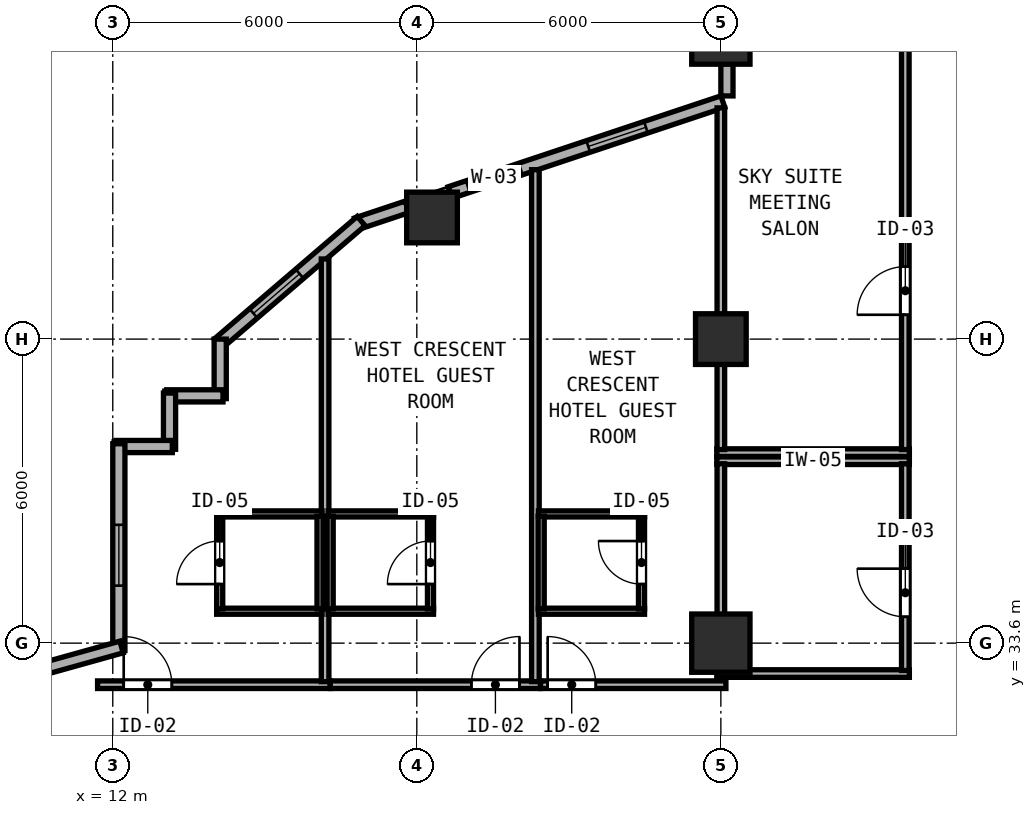
"""IFC4 building model, lengths in metres.
Left out: names, types, materials, properties, quantities, classifications, styles, units other than length and angle.
Written with IfcOpenShell. Run it as: python <this file> out.ifc"""

import sys

from ifc_helpers import new_model, si_unit, direction, frame, frame_2d, origin, origin_2d, place, context, subcontext, project, spatial, rectangle, hollow_rectangle, extrude, element, fill, save


model = new_model("IFC4")
c1 = context("Model", 3, precision=1e-05, world=origin(), true_north=direction((0.0, 1.0)))
c2 = subcontext(c1, "Body", "Model", "MODEL_VIEW")
j1 = project(units=[si_unit("LENGTHUNIT", "METRE"), si_unit("PLANEANGLEUNIT", "RADIAN")], contexts=[c1])
p1 = place(None, origin())
s1 = spatial("IfcSite", under=j1, at=p1, CompositionType="ELEMENT")
p2 = place(p1, origin())
s2 = spatial("IfcBuilding", under=s1, at=p2, CompositionType="ELEMENT")
p3 = place(p2, frame((0.0, 0.0, 85.6)))
s3 = spatial("IfcBuildingStorey", under=s2, at=p3, CompositionType="ELEMENT", Elevation=85.6)
for number, where, z_axis, x_axis in (
    (1, (24.0, 33.6, 0.0), (0.0, 0.0, 1.0), (1.0, 0.0, 0.0)),
    (2, (24.0, 45.6, 0.0), (0.0, 0.0, 1.0), (1.0, 0.0, 0.0)),
):
    element("IfcColumn", number, at=place(p3, frame(where, z_axis=z_axis, x_axis=x_axis)), inside=s3, PredefinedType="COLUMN", context=c2, shape_type="SweptSolid", body=[
        extrude(hollow_rectangle(XDim=1.15, YDim=1.15, WallThickness=0.042, at=origin_2d()), origin(), (0.0, 0.0, 1.0), 3.8),
    ])
for number, where, z_axis, x_axis in (
    (3, (24.0, 39.6, 0.0), (0.0, 0.0, 1.0), (1.0, 0.0, 0.0)),
    (4, (18.3, 42.0, 0.0), (0.0, 0.0, 1.0), (1.0, 0.0, 0.0)),
):
    element("IfcColumn", number, at=place(p3, frame(where, z_axis=z_axis, x_axis=x_axis)), inside=s3, PredefinedType="COLUMN", context=c2, shape_type="SweptSolid", body=[
        extrude(hollow_rectangle(XDim=1.0, YDim=1.0, WallThickness=0.038, at=origin_2d()), origin(), (0.0, 0.0, 1.0), 3.8),
    ])
p4 = place(p3, frame((24.12, 45.033, 0.0), z_axis=(0.0, 0.0, 1.0), x_axis=(0.0, -1.0, 0.0)))
e5 = element("IfcWall", 5, at=p4, inside=s3, PredefinedType="SOLIDWALL", context=c2, shape_type="SweptSolid", body=[
    extrude(rectangle(XDim=0.635, YDim=0.24, at=frame_2d((0.317, 0.0))), origin(), (0.0, 0.0, 1.0), 3.037),
])
p5 = place(p3, frame((24.039, 44.287, 0.0), z_axis=(0.0, 0.0, 1.0), x_axis=(-0.948678995954, -0.316240672014, 0.0)))
e6 = element("IfcWall", 6, at=p5, inside=s3, PredefinedType="SOLIDWALL", context=c2, shape_type="SweptSolid", body=[
    extrude(rectangle(XDim=5.675, YDim=0.24, at=frame_2d((2.837, 0.0))), origin(), (0.0, 0.0, 1.0), 3.037),
])
p6 = place(p5, frame((1.6, 0.0, 0.85)))
e7 = element("IfcOpeningElement", 7, at=p6, cuts=e6, PredefinedType="OPENING", context=c2, shape_type="SweptSolid", body=[
    extrude(rectangle(XDim=1.2, YDim=1.85, at=frame_2d((0.6, 0.925))), frame((0.0, 0.13, 0.0), z_axis=(0.0, -1.0, 0.0), x_axis=(1.0, 0.0, 0.0)), (0.0, 0.0, 1.0), 0.26),
])
p7 = place(p5, frame((4.206, 0.0, 0.85)))
e8 = element("IfcOpeningElement", 8, at=p7, cuts=e6, PredefinedType="OPENING", context=c2, shape_type="SweptSolid", body=[
    extrude(rectangle(XDim=1.1, YDim=1.75, at=frame_2d((0.55, 0.875))), frame((0.0, 0.13, 0.0), z_axis=(0.0, -1.0, 0.0), x_axis=(1.0, 0.0, 0.0)), (0.0, 0.0, 1.0), 0.26),
])
p8 = place(p3, frame((17.808, 42.209, 0.0), z_axis=(0.0, 0.0, 1.0), x_axis=(-0.948706457285, -0.316158279832, 0.0)))
e9 = element("IfcWall", 9, at=p8, inside=s3, PredefinedType="SOLIDWALL", context=c2, shape_type="SweptSolid", body=[
    extrude(rectangle(XDim=1.054, YDim=0.24, at=frame_2d((0.527, 0.0))), origin(), (0.0, 0.0, 1.0), 3.54),
])
p9 = place(p3, frame((16.902, 41.929, 0.0), z_axis=(0.0, 0.0, 1.0), x_axis=(-0.759275136126, -0.650769750112, 0.0)))
e10 = element("IfcWall", 10, at=p9, inside=s3, PredefinedType="SOLIDWALL", context=c2, shape_type="SweptSolid", body=[
    extrude(rectangle(XDim=3.719, YDim=0.24, at=frame_2d((1.86, 0.0))), origin(), (0.0, 0.0, 1.0), 3.54),
])
p10 = place(p9, frame((1.6, 0.0, 0.85)))
e11 = element("IfcOpeningElement", 11, at=p10, cuts=e10, PredefinedType="OPENING", context=c2, shape_type="SweptSolid", body=[
    extrude(rectangle(XDim=1.2, YDim=1.85, at=frame_2d((0.6, 0.925))), frame((0.0, 0.13, 0.0), z_axis=(0.0, -1.0, 0.0), x_axis=(1.0, 0.0, 0.0)), (0.0, 0.0, 1.0), 0.26),
])
p11 = place(p3, frame((14.12, 39.6, 0.0), z_axis=(0.0, 0.0, 1.0), x_axis=(0.0, -1.0, 0.0)))
e12 = element("IfcWall", 12, at=p11, inside=s3, PredefinedType="SOLIDWALL", context=c2, shape_type="SweptSolid", body=[
    extrude(rectangle(XDim=1.175, YDim=0.24, at=frame_2d((0.587, 0.0))), origin(), (0.0, 0.0, 1.0), 3.54),
])
p12 = place(p3, frame((14.175, 38.48, 0.0), z_axis=(0.0, 0.0, 1.0), x_axis=(-1.0, 0.0, 0.0)))
e13 = element("IfcWall", 13, at=p12, inside=s3, PredefinedType="SOLIDWALL", context=c2, shape_type="SweptSolid", body=[
    extrude(rectangle(XDim=1.11, YDim=0.24, at=frame_2d((0.555, 0.0))), origin(), (0.0, 0.0, 1.0), 3.54),
])
p13 = place(p3, frame((13.12, 38.535, 0.0), z_axis=(0.0, 0.0, 1.0), x_axis=(0.0, -1.0, 0.0)))
e14 = element("IfcWall", 14, at=p13, inside=s3, PredefinedType="SOLIDWALL", context=c2, shape_type="SweptSolid", body=[
    extrude(rectangle(XDim=1.11, YDim=0.24, at=frame_2d((0.555, 0.0))), origin(), (0.0, 0.0, 1.0), 3.54),
])
p14 = place(p3, frame((13.175, 37.48, 0.0), z_axis=(0.0, 0.0, 1.0), x_axis=(-1.0, 0.0, 0.0)))
e15 = element("IfcWall", 15, at=p14, inside=s3, PredefinedType="SOLIDWALL", context=c2, shape_type="SweptSolid", body=[
    extrude(rectangle(XDim=1.11, YDim=0.24, at=frame_2d((0.555, 0.0))), origin(), (0.0, 0.0, 1.0), 3.54),
])
p15 = place(p3, frame((12.12, 37.535, 0.0), z_axis=(0.0, 0.0, 1.0), x_axis=(0.0, -1.0, 0.0)))
e16 = element("IfcWall", 16, at=p15, inside=s3, PredefinedType="SOLIDWALL", context=c2, shape_type="SweptSolid", body=[
    extrude(rectangle(XDim=4.081, YDim=0.24, at=frame_2d((2.041, 0.0))), origin(), (0.0, 0.0, 1.0), 3.54),
])
p16 = place(p15, frame((1.6, 0.0, 0.85)))
e17 = element("IfcOpeningElement", 17, at=p16, cuts=e16, PredefinedType="OPENING", context=c2, shape_type="SweptSolid", body=[
    extrude(rectangle(XDim=1.2, YDim=1.85, at=frame_2d((0.6, 0.925))), frame((0.0, 0.13, 0.0), z_axis=(0.0, -1.0, 0.0), x_axis=(1.0, 0.0, 0.0)), (0.0, 0.0, 1.0), 0.26),
])
p17 = place(p3, frame((12.173, 33.524, 0.0), z_axis=(0.0, 0.0, 1.0), x_axis=(-0.963197271032, -0.268795493036, 0.0)))
e18 = element("IfcWall", 18, at=p17, inside=s3, PredefinedType="SOLIDWALL", context=c2, shape_type="SweptSolid", body=[
    extrude(rectangle(XDim=9.095, YDim=0.24, at=frame_2d((4.548, 0.0))), origin(), (0.0, 0.0, 1.0), 3.54),
])
p18 = place(p17, frame((1.6, 0.0, 0.85)))
e19 = element("IfcOpeningElement", 19, at=p18, cuts=e18, PredefinedType="OPENING", context=c2, shape_type="SweptSolid", body=[
    extrude(rectangle(XDim=1.2, YDim=1.85, at=frame_2d((0.6, 0.925))), frame((0.0, 0.13, 0.0), z_axis=(0.0, -1.0, 0.0), x_axis=(1.0, 0.0, 0.0)), (0.0, 0.0, 1.0), 0.26),
])
p19 = place(p17, frame((7.0, 0.0, 0.85)))
e20 = element("IfcOpeningElement", 20, at=p19, cuts=e18, PredefinedType="OPENING", context=c2, shape_type="SweptSolid", body=[
    extrude(rectangle(XDim=1.2, YDim=1.85, at=frame_2d((0.6, 0.925))), frame((0.0, 0.13, 0.0), z_axis=(0.0, -1.0, 0.0), x_axis=(1.0, 0.0, 0.0)), (0.0, 0.0, 1.0), 0.26),
])
for number, where, z_axis, x_axis in (
    (21, (23.92, 37.2, 0.0), (0.0, 0.0, 1.0), (1.0, 0.0, 0.0)),
    (22, (23.92, 33.0, 0.0), (0.0, 0.0, 1.0), (1.0, 0.0, 0.0)),
):
    element("IfcWall", number, at=place(p3, frame(where, z_axis=z_axis, x_axis=x_axis)), inside=s3, PredefinedType="PARTITIONING", context=c2, shape_type="SweptSolid", body=[
        extrude(rectangle(XDim=3.8, YDim=0.15, at=frame_2d((1.9, 0.0))), origin(), (0.0, 0.0, 1.0), 3.54),
    ])
p20 = place(p3, frame((24.0, 33.06, 0.0), z_axis=(0.0, 0.0, 1.0), x_axis=(0.0, 1.0, 0.0)))
e23 = element("IfcWall", 23, at=p20, inside=s3, PredefinedType="PARTITIONING", context=c2, shape_type="SweptSolid", body=[
    extrude(rectangle(XDim=4.08, YDim=0.15, at=frame_2d((2.04, 0.0))), origin(), (0.0, 0.0, 1.0), 3.037),
])
p21 = place(p3, frame((27.64, 33.06, 0.0), z_axis=(0.0, 0.0, 1.0), x_axis=(0.0, 1.0, 0.0)))
e24 = element("IfcWall", 24, at=p21, inside=s3, PredefinedType="PARTITIONING", context=c2, shape_type="SweptSolid", body=[
    extrude(rectangle(XDim=4.08, YDim=0.15, at=frame_2d((2.04, 0.0))), origin(), (0.0, 0.0, 1.0), 3.54),
])
p22 = place(p21, frame((2.01, 0.0, 0.0), z_axis=(0.0, 0.0, 1.0), x_axis=(-1.0, 0.0, 0.0)))
e25 = element("IfcOpeningElement", 25, at=p22, cuts=e24, PredefinedType="OPENING", context=c2, shape_type="SweptSolid", body=[
    extrude(rectangle(XDim=0.95, YDim=2.12, at=frame_2d((0.475, 1.06))), frame((0.0, 0.085, 0.0), z_axis=(0.0, -1.0, 0.0), x_axis=(1.0, 0.0, 0.0)), (0.0, 0.0, 1.0), 0.17),
])
p23 = place(p3, frame((23.92, 37.36, 0.0), z_axis=(0.0, 0.0, 1.0), x_axis=(1.0, 0.0, 0.0)))
e26 = element("IfcWall", 26, at=p23, inside=s3, PredefinedType="PARTITIONING", context=c2, shape_type="SweptSolid", body=[
    extrude(rectangle(XDim=3.8, YDim=0.15, at=frame_2d((1.9, 0.0))), origin(), (0.0, 0.0, 1.0), 3.54),
])
p24 = place(p3, frame((24.0, 37.42, 0.0), z_axis=(0.0, 0.0, 1.0), x_axis=(0.0, 1.0, 0.0)))
e27 = element("IfcWall", 27, at=p24, inside=s3, PredefinedType="PARTITIONING", context=c2, shape_type="SweptSolid", body=[
    extrude(rectangle(XDim=6.743, YDim=0.15, at=frame_2d((3.372, 0.0))), origin(), (0.0, 0.0, 1.0), 3.037),
])
p25 = place(p3, frame((27.64, 37.42, 0.0), z_axis=(0.0, 0.0, 1.0), x_axis=(0.0, 1.0, 0.0)))
e28 = element("IfcWall", 28, at=p25, inside=s3, PredefinedType="PARTITIONING", context=c2, shape_type="SweptSolid", body=[
    extrude(rectangle(XDim=8.54, YDim=0.15, at=frame_2d((4.27, 0.0))), origin(), (0.0, 0.0, 1.0), 3.54),
])
p26 = place(p25, frame((3.61, 0.0, 0.0), z_axis=(0.0, 0.0, 1.0), x_axis=(-1.0, 0.0, 0.0)))
e29 = element("IfcOpeningElement", 29, at=p26, cuts=e28, PredefinedType="OPENING", context=c2, shape_type="SweptSolid", body=[
    extrude(rectangle(XDim=0.95, YDim=2.12, at=frame_2d((0.475, 1.06))), frame((0.0, 0.085, 0.0), z_axis=(0.0, -1.0, 0.0), x_axis=(1.0, 0.0, 0.0)), (0.0, 0.0, 1.0), 0.17),
])
p27 = place(p3, frame((11.7, 32.78, 0.0), z_axis=(0.0, 0.0, 1.0), x_axis=(1.0, 0.0, 0.0)))
e30 = element("IfcWall", 30, at=p27, inside=s3, PredefinedType="PARTITIONING", context=c2, shape_type="SweptSolid", body=[
    extrude(rectangle(XDim=4.59, YDim=0.15, at=frame_2d((2.295, 0.0))), origin(), (0.0, 0.0, 1.0), 3.54),
])
p28 = place(p27, frame((0.516, 0.0, 0.0)))
e31 = element("IfcOpeningElement", 31, at=p28, cuts=e30, PredefinedType="OPENING", context=c2, shape_type="SweptSolid", body=[
    extrude(rectangle(XDim=0.95, YDim=2.15, at=frame_2d((0.475, 1.075))), frame((0.0, 0.085, 0.0), z_axis=(0.0, -1.0, 0.0), x_axis=(1.0, 0.0, 0.0)), (0.0, 0.0, 1.0), 0.17),
])
p29 = place(p3, frame((16.19, 32.84, 0.0), z_axis=(0.0, 0.0, 1.0), x_axis=(0.0, 1.0, 0.0)))
e32 = element("IfcWall", 32, at=p29, inside=s3, PredefinedType="PARTITIONING", context=c2, shape_type="SweptSolid", body=[
    extrude(rectangle(XDim=8.341, YDim=0.15, at=frame_2d((4.17, 0.0))), origin(), (0.0, 0.0, 1.0), 3.54),
])
for number, where, z_axis, x_axis in (
    (33, (14.05, 36.15, 0.0), (0.0, 0.0, 1.0), (1.0, 0.0, 0.0)),
    (34, (14.05, 34.23, 0.0), (0.0, 0.0, 1.0), (1.0, 0.0, 0.0)),
):
    element("IfcWall", number, at=place(p3, frame(where, z_axis=z_axis, x_axis=x_axis)), inside=s3, PredefinedType="PARTITIONING", context=c2, shape_type="SweptSolid", body=[
        extrude(rectangle(XDim=2.08, YDim=0.12, at=frame_2d((1.04, 0.0))), origin(), (0.0, 0.0, 1.0), 3.54),
    ])
p30 = place(p3, frame((14.11, 34.275, 0.0), z_axis=(0.0, 0.0, 1.0), x_axis=(0.0, 1.0, 0.0)))
e35 = element("IfcWall", 35, at=p30, inside=s3, PredefinedType="PARTITIONING", context=c2, shape_type="SweptSolid", body=[
    extrude(rectangle(XDim=1.83, YDim=0.12, at=frame_2d((0.915, 0.0))), origin(), (0.0, 0.0, 1.0), 3.54),
])
p31 = place(p30, frame((1.34, 0.0, 0.0), z_axis=(0.0, 0.0, 1.0), x_axis=(-1.0, 0.0, 0.0)))
e36 = element("IfcOpeningElement", 36, at=p31, cuts=e35, PredefinedType="OPENING", context=c2, shape_type="SweptSolid", body=[
    extrude(rectangle(XDim=0.85, YDim=2.1, at=frame_2d((0.425, 1.05))), frame((0.0, 0.07, 0.0), z_axis=(0.0, -1.0, 0.0), x_axis=(1.0, 0.0, 0.0)), (0.0, 0.0, 1.0), 0.14),
])
p32 = place(p3, frame((16.09, 34.275, 0.0), z_axis=(0.0, 0.0, 1.0), x_axis=(0.0, 1.0, 0.0)))
e37 = element("IfcWall", 37, at=p32, inside=s3, PredefinedType="PARTITIONING", context=c2, shape_type="SweptSolid", body=[
    extrude(rectangle(XDim=1.83, YDim=0.12, at=frame_2d((0.915, 0.0))), origin(), (0.0, 0.0, 1.0), 3.54),
])
p33 = place(p3, frame((16.292, 32.78, 0.0), z_axis=(0.0, 0.0, 1.0), x_axis=(1.0, 0.0, 0.0)))
e38 = element("IfcWall", 38, at=p33, inside=s3, PredefinedType="PARTITIONING", context=c2, shape_type="SweptSolid", body=[
    extrude(rectangle(XDim=4.148, YDim=0.15, at=frame_2d((2.074, 0.0))), origin(), (0.0, 0.0, 1.0), 3.54),
])
p34 = place(p33, frame((2.784, 0.0, 0.0)))
e39 = element("IfcOpeningElement", 39, at=p34, cuts=e38, PredefinedType="OPENING", context=c2, shape_type="SweptSolid", body=[
    extrude(rectangle(XDim=0.95, YDim=2.15, at=frame_2d((0.475, 1.075))), frame((0.0, 0.085, 0.0), z_axis=(0.0, -1.0, 0.0), x_axis=(1.0, 0.0, 0.0)), (0.0, 0.0, 1.0), 0.17),
])
p35 = place(p3, frame((20.34, 32.84, 0.0), z_axis=(0.0, 0.0, 1.0), x_axis=(0.0, 1.0, 0.0)))
e40 = element("IfcWall", 40, at=p35, inside=s3, PredefinedType="PARTITIONING", context=c2, shape_type="SweptSolid", body=[
    extrude(rectangle(XDim=10.103, YDim=0.15, at=frame_2d((5.051, 0.0))), origin(), (0.0, 0.0, 1.0), 3.54),
])
for number, where, z_axis, x_axis in (
    (41, (16.25, 36.15, 0.0), (0.0, 0.0, 1.0), (1.0, 0.0, 0.0)),
    (42, (16.25, 34.23, 0.0), (0.0, 0.0, 1.0), (1.0, 0.0, 0.0)),
):
    element("IfcWall", number, at=place(p3, frame(where, z_axis=z_axis, x_axis=x_axis)), inside=s3, PredefinedType="PARTITIONING", context=c2, shape_type="SweptSolid", body=[
        extrude(rectangle(XDim=2.08, YDim=0.12, at=frame_2d((1.04, 0.0))), origin(), (0.0, 0.0, 1.0), 3.54),
    ])
p36 = place(p3, frame((16.29, 34.275, 0.0), z_axis=(0.0, 0.0, 1.0), x_axis=(0.0, 1.0, 0.0)))
e43 = element("IfcWall", 43, at=p36, inside=s3, PredefinedType="PARTITIONING", context=c2, shape_type="SweptSolid", body=[
    extrude(rectangle(XDim=1.83, YDim=0.12, at=frame_2d((0.915, 0.0))), origin(), (0.0, 0.0, 1.0), 3.54),
])
p37 = place(p3, frame((18.27, 34.275, 0.0), z_axis=(0.0, 0.0, 1.0), x_axis=(0.0, 1.0, 0.0)))
e44 = element("IfcWall", 44, at=p37, inside=s3, PredefinedType="PARTITIONING", context=c2, shape_type="SweptSolid", body=[
    extrude(rectangle(XDim=1.83, YDim=0.12, at=frame_2d((0.915, 0.0))), origin(), (0.0, 0.0, 1.0), 3.54),
])
p38 = place(p37, frame((0.49, 0.0, 0.0)))
e45 = element("IfcOpeningElement", 45, at=p38, cuts=e44, PredefinedType="OPENING", context=c2, shape_type="SweptSolid", body=[
    extrude(rectangle(XDim=0.85, YDim=2.1, at=frame_2d((0.425, 1.05))), frame((0.0, 0.07, 0.0), z_axis=(0.0, -1.0, 0.0), x_axis=(1.0, 0.0, 0.0)), (0.0, 0.0, 1.0), 0.14),
])
p39 = place(p3, frame((20.442, 32.78, 0.0), z_axis=(0.0, 0.0, 1.0), x_axis=(1.0, 0.0, 0.0)))
e46 = element("IfcWall", 46, at=p39, inside=s3, PredefinedType="PARTITIONING", context=c2, shape_type="SweptSolid", body=[
    extrude(rectangle(XDim=3.658, YDim=0.15, at=frame_2d((1.829, 0.0))), origin(), (0.0, 0.0, 1.0), 3.54),
])
p40 = place(p39, frame((0.14, 0.0, 0.0)))
e47 = element("IfcOpeningElement", 47, at=p40, cuts=e46, PredefinedType="OPENING", context=c2, shape_type="SweptSolid", body=[
    extrude(rectangle(XDim=0.95, YDim=2.15, at=frame_2d((0.475, 1.075))), frame((0.0, 0.085, 0.0), z_axis=(0.0, -1.0, 0.0), x_axis=(1.0, 0.0, 0.0)), (0.0, 0.0, 1.0), 0.17),
])
for number, where, z_axis, x_axis in (
    (48, (20.4, 36.15, 0.0), (0.0, 0.0, 1.0), (1.0, 0.0, 0.0)),
    (49, (20.4, 34.23, 0.0), (0.0, 0.0, 1.0), (1.0, 0.0, 0.0)),
):
    element("IfcWall", number, at=place(p3, frame(where, z_axis=z_axis, x_axis=x_axis)), inside=s3, PredefinedType="PARTITIONING", context=c2, shape_type="SweptSolid", body=[
        extrude(rectangle(XDim=2.094, YDim=0.12, at=frame_2d((1.047, 0.0))), origin(), (0.0, 0.0, 1.0), 3.54),
    ])
p41 = place(p3, frame((20.454, 34.275, 0.0), z_axis=(0.0, 0.0, 1.0), x_axis=(0.0, 1.0, 0.0)))
e50 = element("IfcWall", 50, at=p41, inside=s3, PredefinedType="PARTITIONING", context=c2, shape_type="SweptSolid", body=[
    extrude(rectangle(XDim=1.83, YDim=0.12, at=frame_2d((0.915, 0.0))), origin(), (0.0, 0.0, 1.0), 3.54),
])
p42 = place(p3, frame((22.434, 34.275, 0.0), z_axis=(0.0, 0.0, 1.0), x_axis=(0.0, 1.0, 0.0)))
e51 = element("IfcWall", 51, at=p42, inside=s3, PredefinedType="PARTITIONING", context=c2, shape_type="SweptSolid", body=[
    extrude(rectangle(XDim=1.83, YDim=0.12, at=frame_2d((0.915, 0.0))), origin(), (0.0, 0.0, 1.0), 3.54),
])
p43 = place(p42, frame((0.49, 0.0, 0.0)))
e52 = element("IfcOpeningElement", 52, at=p43, cuts=e51, PredefinedType="OPENING", context=c2, shape_type="SweptSolid", body=[
    extrude(rectangle(XDim=0.85, YDim=2.1, at=frame_2d((0.425, 1.05))), frame((0.0, 0.07, 0.0), z_axis=(0.0, -1.0, 0.0), x_axis=(1.0, 0.0, 0.0)), (0.0, 0.0, 1.0), 0.14),
])
p44 = place(p6, origin())
e53 = element("IfcWindow", 53, at=p44, inside=s3, PartitioningType="SINGLE_PANEL", PredefinedType="WINDOW", context=c2, shape_type="SweptSolid", body=[
    extrude(rectangle(XDim=1.2, YDim=1.85, at=frame_2d((0.6, 0.925))), frame((0.0, 0.03, 0.0), z_axis=(0.0, -1.0, 0.0), x_axis=(1.0, 0.0, 0.0)), (0.0, 0.0, 1.0), 0.06),
])
fill(e7, e53)
p45 = place(p10, origin())
e54 = element("IfcWindow", 54, at=p45, inside=s3, PartitioningType="SINGLE_PANEL", PredefinedType="WINDOW", context=c2, shape_type="SweptSolid", body=[
    extrude(rectangle(XDim=1.2, YDim=1.85, at=frame_2d((0.6, 0.925))), frame((0.0, 0.03, 0.0), z_axis=(0.0, -1.0, 0.0), x_axis=(1.0, 0.0, 0.0)), (0.0, 0.0, 1.0), 0.06),
])
fill(e11, e54)
p46 = place(p16, origin())
e55 = element("IfcWindow", 55, at=p46, inside=s3, PartitioningType="SINGLE_PANEL", PredefinedType="WINDOW", context=c2, shape_type="SweptSolid", body=[
    extrude(rectangle(XDim=1.2, YDim=1.85, at=frame_2d((0.6, 0.925))), frame((0.0, 0.03, 0.0), z_axis=(0.0, -1.0, 0.0), x_axis=(1.0, 0.0, 0.0)), (0.0, 0.0, 1.0), 0.06),
])
fill(e17, e55)
p47 = place(p22, origin())
e56 = element("IfcDoor", 56, at=p47, inside=s3, OperationType="SINGLE_SWING_LEFT", PredefinedType="DOOR", context=c2, shape_type="SweptSolid", body=[
    extrude(rectangle(XDim=0.95, YDim=2.12, at=frame_2d((0.475, 1.06))), frame((0.0, 0.025, 0.0), z_axis=(0.0, -1.0, 0.0), x_axis=(1.0, 0.0, 0.0)), (0.0, 0.0, 1.0), 0.05),
])
fill(e25, e56)
p48 = place(p26, origin())
e57 = element("IfcDoor", 57, at=p48, inside=s3, OperationType="SINGLE_SWING_RIGHT", PredefinedType="DOOR", context=c2, shape_type="SweptSolid", body=[
    extrude(rectangle(XDim=0.95, YDim=2.12, at=frame_2d((0.475, 1.06))), frame((0.0, 0.025, 0.0), z_axis=(0.0, -1.0, 0.0), x_axis=(1.0, 0.0, 0.0)), (0.0, 0.0, 1.0), 0.05),
])
fill(e29, e57)
p49 = place(p28, origin())
e58 = element("IfcDoor", 58, at=p49, inside=s3, OperationType="SINGLE_SWING_LEFT", PredefinedType="DOOR", context=c2, shape_type="SweptSolid", body=[
    extrude(rectangle(XDim=0.95, YDim=2.15, at=frame_2d((0.475, 1.075))), frame((0.0, 0.025, 0.0), z_axis=(0.0, -1.0, 0.0), x_axis=(1.0, 0.0, 0.0)), (0.0, 0.0, 1.0), 0.05),
])
fill(e31, e58)
p50 = place(p31, origin())
e59 = element("IfcDoor", 59, at=p50, inside=s3, OperationType="SINGLE_SWING_RIGHT", PredefinedType="DOOR", context=c2, shape_type="SweptSolid", body=[
    extrude(rectangle(XDim=0.85, YDim=2.1, at=frame_2d((0.425, 1.05))), frame((0.0, 0.025, 0.0), z_axis=(0.0, -1.0, 0.0), x_axis=(1.0, 0.0, 0.0)), (0.0, 0.0, 1.0), 0.05),
])
fill(e36, e59)
p51 = place(p34, origin())
e60 = element("IfcDoor", 60, at=p51, inside=s3, OperationType="SINGLE_SWING_RIGHT", PredefinedType="DOOR", context=c2, shape_type="SweptSolid", body=[
    extrude(rectangle(XDim=0.95, YDim=2.15, at=frame_2d((0.475, 1.075))), frame((0.0, 0.025, 0.0), z_axis=(0.0, -1.0, 0.0), x_axis=(1.0, 0.0, 0.0)), (0.0, 0.0, 1.0), 0.05),
])
fill(e39, e60)
p52 = place(p38, origin())
e61 = element("IfcDoor", 61, at=p52, inside=s3, OperationType="SINGLE_SWING_LEFT", PredefinedType="DOOR", context=c2, shape_type="SweptSolid", body=[
    extrude(rectangle(XDim=0.85, YDim=2.1, at=frame_2d((0.425, 1.05))), frame((0.0, 0.025, 0.0), z_axis=(0.0, -1.0, 0.0), x_axis=(1.0, 0.0, 0.0)), (0.0, 0.0, 1.0), 0.05),
])
fill(e45, e61)
p53 = place(p40, origin())
e62 = element("IfcDoor", 62, at=p53, inside=s3, OperationType="SINGLE_SWING_LEFT", PredefinedType="DOOR", context=c2, shape_type="SweptSolid", body=[
    extrude(rectangle(XDim=0.95, YDim=2.15, at=frame_2d((0.475, 1.075))), frame((0.0, 0.025, 0.0), z_axis=(0.0, -1.0, 0.0), x_axis=(1.0, 0.0, 0.0)), (0.0, 0.0, 1.0), 0.05),
])
fill(e47, e62)
p54 = place(p43, origin())
e63 = element("IfcDoor", 63, at=p54, inside=s3, OperationType="SINGLE_SWING_RIGHT", PredefinedType="DOOR", context=c2, shape_type="SweptSolid", body=[
    extrude(rectangle(XDim=0.85, YDim=2.1, at=frame_2d((0.425, 1.05))), frame((0.0, 0.025, 0.0), z_axis=(0.0, -1.0, 0.0), x_axis=(1.0, 0.0, 0.0)), (0.0, 0.0, 1.0), 0.05),
])
fill(e52, e63)
p55 = place(p7, origin())
e64 = element("IfcWindow", 64, at=p55, inside=s3, PartitioningType="SINGLE_PANEL", PredefinedType="WINDOW", context=c2, shape_type="SweptSolid", body=[
    extrude(rectangle(XDim=1.1, YDim=1.75, at=frame_2d((0.55, 0.875))), frame((0.0, 0.03, 0.0), z_axis=(0.0, -1.0, 0.0), x_axis=(1.0, 0.0, 0.0)), (0.0, 0.0, 1.0), 0.06),
])
fill(e8, e64)
save(model, sys.argv[1])
